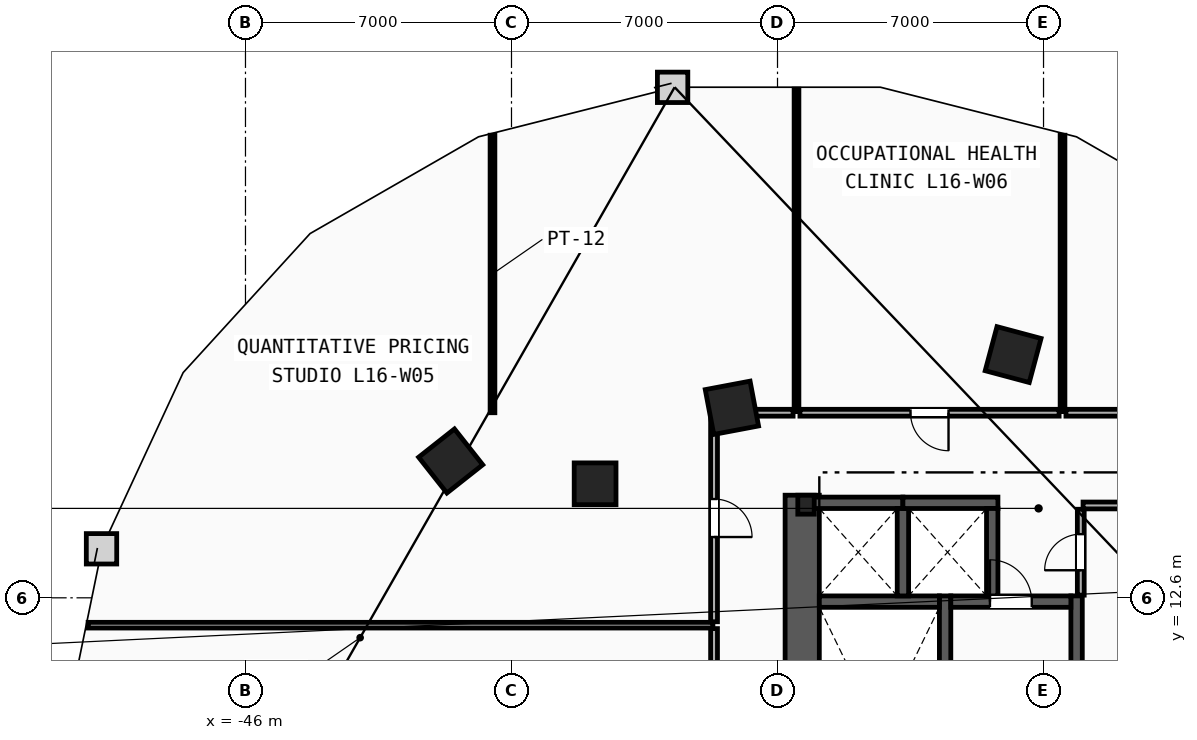
"""IFC4 building model, lengths in metres.
Left out: names, types, materials, properties, quantities, classifications, styles, units other than length and angle.
Written with IfcOpenShell. Run it as: python <this file> out.ifc"""

import sys

from ifc_helpers import new_model, si_unit, direction, frame, frame_2d, origin, origin_2d, place, context, subcontext, project, spatial, rectangle, i_section, extrude, element, fill, save


model = new_model("IFC4")
c1 = context("Model", 3, precision=1e-05, world=origin(), true_north=direction((0.0, 1.0)))
c2 = subcontext(c1, "Body", "Model", "MODEL_VIEW")
j1 = project(units=[si_unit("LENGTHUNIT", "METRE"), si_unit("PLANEANGLEUNIT", "RADIAN")], contexts=[c1])
p1 = place(None, origin())
s1 = spatial("IfcSite", under=j1, at=p1, CompositionType="ELEMENT")
p2 = place(p1, origin())
s2 = spatial("IfcBuilding", under=s1, at=p2, CompositionType="ELEMENT")
p3 = place(p2, frame((0.0, 0.0, 65.8)))
s3 = spatial("IfcBuildingStorey", under=s2, at=p3, CompositionType="ELEMENT", Elevation=65.8)
p4 = place(p3, frame((-31.25, 15.05, 0.0), z_axis=(0.0, 0.0, 1.0), x_axis=(1.0, 0.0, 0.0)))
e1 = element("IfcColumn", 1, at=p4, inside=s3, PredefinedType="COLUMN", context=c2, shape_type="SweptSolid", body=[
    extrude(i_section(OverallWidth=0.432, OverallDepth=0.498, WebThickness=0.056, FlangeThickness=0.089, FilletRadius=0.018, at=origin_2d()), origin(), (0.0, 0.0, 1.0), 3.8),
])
p5 = place(p3, frame((-36.8, 15.6, 0.0), z_axis=(0.0, 0.0, 1.0), x_axis=(1.0, 0.0, 0.0)))
e2 = element("IfcColumn", 2, at=p5, inside=s3, PredefinedType="COLUMN", context=c2, shape_type="SweptSolid", body=[
    extrude(rectangle(XDim=1.1, YDim=1.1, at=origin_2d()), origin(), (0.0, 0.0, 1.0), 3.8),
])
for number, where, z_axis, x_axis in (
    (3, (-25.8, 19.0, 0.0), (0.0, 0.0, 1.0), (-0.966, 0.259, 0.0)),
    (4, (-33.2, 17.6, 0.0), (0.0, 0.0, 1.0), (-0.983, -0.186, 0.0)),
    (5, (-40.6, 16.2, 0.0), (0.0, 0.0, 1.0), (-0.785, -0.619, 0.0)),
):
    element("IfcColumn", number, at=place(p3, frame(where, z_axis=z_axis, x_axis=x_axis)), inside=s3, PredefinedType="COLUMN", context=c2, shape_type="SweptSolid", body=[
        extrude(rectangle(XDim=1.2, YDim=1.2, at=origin_2d()), origin(), (0.0, 0.0, 1.0), 3.8),
    ])
p6 = place(p3, frame((-31.35, 1.97, 0.0), z_axis=(0.0, 0.0, 1.0), x_axis=(0.0, 1.0, 0.0)))
e6 = element("IfcWall", 6, at=p6, inside=s3, PredefinedType="SHEAR", context=c2, shape_type="SweptSolid", body=[
    extrude(rectangle(XDim=13.33, YDim=0.9, at=frame_2d((6.665, 0.0))), origin(), (0.0, 0.0, 1.0), 3.5),
])
for number, where, z_axis, x_axis in (
    (7, (-27.59, 1.97, 0.0), (0.0, 0.0, 1.0), (0.0, 1.0, 0.0)),
    (8, (-24.13, 1.97, 0.0), (0.0, 0.0, 1.0), (0.0, 1.0, 0.0)),
):
    element("IfcWall", number, at=place(p3, frame(where, z_axis=z_axis, x_axis=x_axis)), inside=s3, PredefinedType="SHEAR", context=c2, shape_type="SweptSolid", body=[
        extrude(rectangle(XDim=10.68, YDim=0.3, at=frame_2d((5.34, 0.0))), origin(), (0.0, 0.0, 1.0), 3.5),
    ])
p7 = place(p3, frame((-30.9, 12.5, 0.0), z_axis=(0.0, 0.0, 1.0), x_axis=(1.0, 0.0, 0.0)))
e9 = element("IfcWall", 9, at=p7, inside=s3, PredefinedType="SHEAR", context=c2, shape_type="SweptSolid", body=[
    extrude(rectangle(XDim=3.16, YDim=0.3, at=frame_2d((1.58, 0.0))), origin(), (0.0, 0.0, 1.0), 3.5),
])
p8 = place(p3, frame((-27.44, 12.5, 0.0), z_axis=(0.0, 0.0, 1.0), x_axis=(1.0, 0.0, 0.0)))
e10 = element("IfcWall", 10, at=p8, inside=s3, PredefinedType="SHEAR", context=c2, shape_type="SweptSolid", body=[
    extrude(rectangle(XDim=3.16, YDim=0.3, at=frame_2d((1.58, 0.0))), origin(), (0.0, 0.0, 1.0), 3.5),
])
p9 = place(p8, frame((1.03, 0.0, 0.0)))
e11 = element("IfcOpeningElement", 11, at=p9, cuts=e10, PredefinedType="OPENING", context=c2, shape_type="SweptSolid", body=[
    extrude(rectangle(XDim=1.1, YDim=2.15, at=frame_2d((0.55, 1.075))), frame((0.0, 0.16, 0.0), z_axis=(0.0, -1.0, 0.0), x_axis=(1.0, 0.0, 0.0)), (0.0, 0.0, 1.0), 0.32),
])
p10 = place(p3, frame((-31.2, 15.1, 0.0), z_axis=(0.0, 0.0, 1.0), x_axis=(1.0, 0.0, 0.0)))
e12 = element("IfcWall", 12, at=p10, inside=s3, PredefinedType="SHEAR", context=c2, shape_type="SweptSolid", body=[
    extrude(rectangle(XDim=2.5, YDim=0.3, at=frame_2d((1.25, 0.0))), origin(), (0.0, 0.0, 1.0), 3.5),
])
p11 = place(p3, frame((-28.7, 12.65, 0.0), z_axis=(0.0, 0.0, 1.0), x_axis=(0.0, 1.0, 0.0)))
e13 = element("IfcWall", 13, at=p11, inside=s3, PredefinedType="SHEAR", context=c2, shape_type="SweptSolid", body=[
    extrude(rectangle(XDim=2.3, YDim=0.3, at=frame_2d((1.15, 0.0))), origin(), (0.0, 0.0, 1.0), 3.5),
])
p12 = place(p3, frame((-28.7, 15.1, 0.0), z_axis=(0.0, 0.0, 1.0), x_axis=(1.0, 0.0, 0.0)))
e14 = element("IfcWall", 14, at=p12, inside=s3, PredefinedType="SHEAR", context=c2, shape_type="SweptSolid", body=[
    extrude(rectangle(XDim=2.5, YDim=0.3, at=frame_2d((1.25, 0.0))), origin(), (0.0, 0.0, 1.0), 3.5),
])
p13 = place(p3, frame((-26.35, 12.65, 0.0), z_axis=(0.0, 0.0, 1.0), x_axis=(0.0, 1.0, 0.0)))
e15 = element("IfcWall", 15, at=p13, inside=s3, PredefinedType="SHEAR", context=c2, shape_type="SweptSolid", body=[
    extrude(rectangle(XDim=2.3, YDim=0.3, at=frame_2d((1.15, 0.0))), origin(), (0.0, 0.0, 1.0), 3.5),
])
p14 = place(p3, frame((-23.96, 15.03, 0.0), z_axis=(0.0, 0.0, 1.0), x_axis=(1.0, 0.0, 0.0)))
e16 = element("IfcWall", 16, at=p14, inside=s3, PredefinedType="PARTITIONING", context=c2, shape_type="SweptSolid", body=[
    extrude(rectangle(XDim=2.61, YDim=0.18, at=frame_2d((1.305, 0.0))), origin(), (0.0, 0.0, 1.0), 2.573),
])
p15 = place(p3, frame((-24.02, 12.67, 0.0), z_axis=(0.0, 0.0, 1.0), x_axis=(0.0, 1.0, 0.0)))
e17 = element("IfcWall", 17, at=p15, inside=s3, PredefinedType="PARTITIONING", context=c2, shape_type="SweptSolid", body=[
    extrude(rectangle(XDim=2.26, YDim=0.18, at=frame_2d((1.13, 0.0))), origin(), (0.0, 0.0, 1.0), 3.5),
])
p16 = place(p15, frame((0.655, 0.0, 0.0)))
e18 = element("IfcOpeningElement", 18, at=p16, cuts=e17, PredefinedType="OPENING", context=c2, shape_type="SweptSolid", body=[
    extrude(rectangle(XDim=0.95, YDim=2.1, at=frame_2d((0.475, 1.05))), frame((0.0, 0.1, 0.0), z_axis=(0.0, -1.0, 0.0), x_axis=(1.0, 0.0, 0.0)), (0.0, 0.0, 1.0), 0.2),
])
p17 = place(p3, frame((-50.141, 11.88, 0.0), z_axis=(0.0, 0.0, 1.0), x_axis=(1.0, 0.0, 0.0)))
e19 = element("IfcWall", 19, at=p17, inside=s3, PredefinedType="PARTITIONING", context=c2, shape_type="SweptSolid", body=[
    extrude(rectangle(XDim=16.441, YDim=0.15, at=frame_2d((8.22, 0.0))), origin(), (0.0, 0.0, 1.0), 3.5),
])
p18 = place(p3, frame((-39.5, 17.47, 0.0), z_axis=(0.0, 0.0, 1.0), x_axis=(0.0, 1.0, 0.0)))
e20 = element("IfcWall", 20, at=p18, inside=s3, PredefinedType="PARTITIONING", context=c2, shape_type="SweptSolid", body=[
    extrude(rectangle(XDim=7.302, YDim=0.125, at=frame_2d((3.651, 0.0))), origin(), (0.0, 0.0, 1.0), 3.5),
])
p19 = place(p3, frame((-31.5, 17.5, 0.0), z_axis=(0.0, 0.0, 1.0), x_axis=(0.0, 1.0, 0.0)))
e21 = element("IfcWall", 21, at=p19, inside=s3, PredefinedType="PARTITIONING", context=c2, shape_type="SweptSolid", body=[
    extrude(rectangle(XDim=8.485, YDim=0.125, at=frame_2d((4.243, 0.0))), origin(), (0.0, 0.0, 1.0), 3.5),
])
p20 = place(p3, frame((-24.5, 17.5, 0.0), z_axis=(0.0, 0.0, 1.0), x_axis=(0.0, 1.0, 0.0)))
e22 = element("IfcWall", 22, at=p20, inside=s3, PredefinedType="PARTITIONING", context=c2, shape_type="SweptSolid", body=[
    extrude(rectangle(XDim=7.272, YDim=0.125, at=frame_2d((3.636, 0.0))), origin(), (0.0, 0.0, 1.0), 3.5),
])
p21 = place(p3, frame((-33.67, 11.79, 0.0), z_axis=(0.0, 0.0, 1.0), x_axis=(0.0, -1.0, 0.0)))
e23 = element("IfcWall", 23, at=p21, inside=s3, PredefinedType="PARTITIONING", context=c2, shape_type="SweptSolid", body=[
    extrude(rectangle(XDim=2.089, YDim=0.18, at=frame_2d((1.044, 0.0))), origin(), (0.0, 0.0, 1.0), 3.5),
])
p22 = place(p3, frame((-16.822, 17.47, 0.0), z_axis=(0.0, 0.0, 1.0), x_axis=(-1.0, 0.0, 0.0)))
e24 = element("IfcWall", 24, at=p22, inside=s3, PredefinedType="PARTITIONING", context=c2, shape_type="SweptSolid", body=[
    extrude(rectangle(XDim=7.588, YDim=0.18, at=frame_2d((3.794, 0.0))), origin(), (0.0, 0.0, 1.0), 3.5),
])
p23 = place(p3, frame((-33.67, 17.428, 0.0), z_axis=(0.0, 0.0, 1.0), x_axis=(0.0, -1.0, 0.0)))
e25 = element("IfcWall", 25, at=p23, inside=s3, PredefinedType="PARTITIONING", context=c2, shape_type="SweptSolid", body=[
    extrude(rectangle(XDim=5.458, YDim=0.18, at=frame_2d((2.729, 0.0))), origin(), (0.0, 0.0, 1.0), 3.5),
])
p24 = place(p23, frame((2.229, 0.0, 0.0)))
e26 = element("IfcOpeningElement", 26, at=p24, cuts=e25, PredefinedType="OPENING", context=c2, shape_type="SweptSolid", body=[
    extrude(rectangle(XDim=1.0, YDim=2.15, at=frame_2d((0.5, 1.075))), frame((0.0, 0.1, 0.0), z_axis=(0.0, -1.0, 0.0), x_axis=(1.0, 0.0, 0.0)), (0.0, 0.0, 1.0), 0.2),
])
p25 = place(p3, frame((-31.59, 17.47, 0.0), z_axis=(0.0, 0.0, 1.0), x_axis=(-1.0, 0.0, 0.0)))
e27 = element("IfcWall", 27, at=p25, inside=s3, PredefinedType="PARTITIONING", context=c2, shape_type="SweptSolid", body=[
    extrude(rectangle(XDim=2.038, YDim=0.18, at=frame_2d((1.019, 0.0))), origin(), (0.0, 0.0, 1.0), 3.5),
])
p26 = place(p3, frame((-24.59, 17.47, 0.0), z_axis=(0.0, 0.0, 1.0), x_axis=(-1.0, 0.0, 0.0)))
e28 = element("IfcWall", 28, at=p26, inside=s3, PredefinedType="PARTITIONING", context=c2, shape_type="SweptSolid", body=[
    extrude(rectangle(XDim=6.82, YDim=0.18, at=frame_2d((3.41, 0.0))), origin(), (0.0, 0.0, 1.0), 3.5),
])
p27 = place(p26, frame((2.91, 0.0, 0.0)))
e29 = element("IfcOpeningElement", 29, at=p27, cuts=e28, PredefinedType="OPENING", context=c2, shape_type="SweptSolid", body=[
    extrude(rectangle(XDim=1.0, YDim=2.15, at=frame_2d((0.5, 1.075))), frame((0.0, 0.1, 0.0), z_axis=(0.0, -1.0, 0.0), x_axis=(1.0, 0.0, 0.0)), (0.0, 0.0, 1.0), 0.2),
])
p28 = place(p9, origin())
e30 = element("IfcDoor", 30, at=p28, inside=s3, OperationType="SINGLE_SWING_LEFT", PredefinedType="DOOR", context=c2, shape_type="SweptSolid", body=[
    extrude(rectangle(XDim=1.1, YDim=2.15, at=frame_2d((0.55, 1.075))), frame((0.0, 0.025, 0.0), z_axis=(0.0, -1.0, 0.0), x_axis=(1.0, 0.0, 0.0)), (0.0, 0.0, 1.0), 0.05),
])
fill(e11, e30)
p29 = place(p27, origin())
e31 = element("IfcDoor", 31, at=p29, inside=s3, OperationType="SINGLE_SWING_LEFT", PredefinedType="DOOR", context=c2, shape_type="SweptSolid", body=[
    extrude(rectangle(XDim=1.0, YDim=2.15, at=frame_2d((0.5, 1.075))), frame((0.0, 0.025, 0.0), z_axis=(0.0, -1.0, 0.0), x_axis=(1.0, 0.0, 0.0)), (0.0, 0.0, 1.0), 0.05),
])
fill(e29, e31)
p30 = place(p24, origin())
e32 = element("IfcDoor", 32, at=p30, inside=s3, OperationType="SINGLE_SWING_RIGHT", PredefinedType="DOOR", context=c2, shape_type="SweptSolid", body=[
    extrude(rectangle(XDim=1.0, YDim=2.15, at=frame_2d((0.5, 1.075))), frame((0.0, 0.025, 0.0), z_axis=(0.0, -1.0, 0.0), x_axis=(1.0, 0.0, 0.0)), (0.0, 0.0, 1.0), 0.05),
])
fill(e26, e32)
p31 = place(p16, origin())
e33 = element("IfcDoor", 33, at=p31, inside=s3, OperationType="SINGLE_SWING_LEFT", PredefinedType="DOOR", context=c2, shape_type="SweptSolid", body=[
    extrude(rectangle(XDim=0.95, YDim=2.1, at=frame_2d((0.475, 1.05))), frame((0.0, 0.025, 0.0), z_axis=(0.0, -1.0, 0.0), x_axis=(1.0, 0.0, 0.0)), (0.0, 0.0, 1.0), 0.05),
])
fill(e18, e33)
save(model, sys.argv[1])
